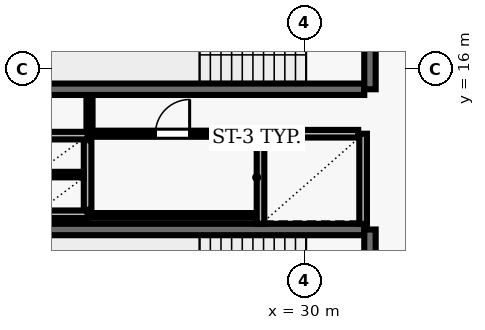
"""IFC4 building model, lengths in metres.
Left out: names, types, materials, properties, quantities, classifications, styles, units other than length and angle.
Written with IfcOpenShell. Run it as: python <this file> out.ifc"""

import sys

from ifc_helpers import new_model, si_unit, direction, frame, frame_2d, origin, place, context, subcontext, project, spatial, rectangle, extrude, element, fill, save


model = new_model("IFC4")
c1 = context("Model", 3, precision=1e-05, world=origin(), true_north=direction((0.0, 1.0)))
c2 = subcontext(c1, "Body", "Model", "MODEL_VIEW")
j1 = project(units=[si_unit("LENGTHUNIT", "METRE"), si_unit("PLANEANGLEUNIT", "RADIAN")], contexts=[c1])
p1 = place(None, origin())
s1 = spatial("IfcSite", under=j1, at=p1, CompositionType="ELEMENT")
p2 = place(p1, origin())
s2 = spatial("IfcBuilding", under=s1, at=p2, CompositionType="ELEMENT")
p3 = place(p2, frame((0.0, 0.0, 115.1)))
s3 = spatial("IfcBuildingStorey", under=s2, at=p3, CompositionType="ELEMENT", Elevation=115.1)
p4 = place(p3, frame((23.22, 15.47, 0.0), z_axis=(0.0, 0.0, 1.0), x_axis=(1.0, 0.0, 0.0)))
e1 = element("IfcWall", 1, at=p4, inside=s3, PredefinedType="SHEAR", context=c2, shape_type="SweptSolid", body=[
    extrude(rectangle(XDim=8.36, YDim=0.3, at=frame_2d((4.18, 0.0))), origin(), (0.0, 0.0, 1.0), 3.69),
])
p5 = place(p3, frame((31.73, 15.47, 0.0), z_axis=(0.0, 0.0, 1.0), x_axis=(0.0, 1.0, 0.0)))
e2 = element("IfcWall", 2, at=p5, inside=s3, PredefinedType="SHEAR", context=c2, shape_type="SweptSolid", body=[
    extrude(rectangle(XDim=3.51, YDim=0.3, at=frame_2d((1.755, 0.0))), origin(), (0.0, 0.0, 1.0), 3.69),
])
p6 = place(p5, frame((1.18, 0.0, 0.0)))
e3 = element("IfcOpeningElement", 3, at=p6, cuts=e2, PredefinedType="OPENING", context=c2, shape_type="SweptSolid", body=[
    extrude(rectangle(XDim=1.15, YDim=2.15, at=frame_2d((0.575, 1.075))), frame((0.0, 0.16, 0.0), z_axis=(0.0, -1.0, 0.0), x_axis=(1.0, 0.0, 0.0)), (0.0, 0.0, 1.0), 0.32),
])
p7 = place(p3, frame((31.58, 11.78, 0.0), z_axis=(0.0, 0.0, 1.0), x_axis=(-1.0, 0.0, 0.0)))
e4 = element("IfcWall", 4, at=p7, inside=s3, PredefinedType="SHEAR", context=c2, shape_type="SweptSolid", body=[
    extrude(rectangle(XDim=8.36, YDim=0.3, at=frame_2d((4.18, 0.0))), origin(), (0.0, 0.0, 1.0), 3.69),
])
p8 = place(p3, frame((31.73, 8.27, 0.0), z_axis=(0.0, 0.0, 1.0), x_axis=(0.0, 1.0, 0.0)))
e5 = element("IfcWall", 5, at=p8, inside=s3, PredefinedType="SHEAR", context=c2, shape_type="SweptSolid", body=[
    extrude(rectangle(XDim=3.51, YDim=0.3, at=frame_2d((1.755, 0.0))), origin(), (0.0, 0.0, 1.0), 3.69),
])
p9 = place(p8, frame((1.18, 0.0, 0.0)))
e6 = element("IfcOpeningElement", 6, at=p9, cuts=e5, PredefinedType="OPENING", context=c2, shape_type="SweptSolid", body=[
    extrude(rectangle(XDim=1.15, YDim=2.15, at=frame_2d((0.575, 1.075))), frame((0.0, 0.16, 0.0), z_axis=(0.0, -1.0, 0.0), x_axis=(1.0, 0.0, 0.0)), (0.0, 0.0, 1.0), 0.32),
])
for number, where, z_axis, x_axis in (
    (7, (28.85, 14.3, 0.0), (0.0, 0.0, 1.0), (0.0, -1.0, 0.0)),
    (8, (31.55, 11.93, 0.0), (0.0, 0.0, 1.0), (0.0, 1.0, 0.0)),
):
    element("IfcWall", number, at=place(p3, frame(where, z_axis=z_axis, x_axis=x_axis)), inside=s3, PredefinedType="SOLIDWALL", context=c2, shape_type="SweptSolid", body=[
        extrude(rectangle(XDim=2.37, YDim=0.2, at=frame_2d((1.185, 0.0))), origin(), (0.0, 0.0, 1.0), 3.69),
    ])
p10 = place(p3, frame((31.42, 14.3, 0.0), z_axis=(0.0, 0.0, 1.0), x_axis=(-1.0, 0.0, 0.0)))
e9 = element("IfcWall", 9, at=p10, inside=s3, PredefinedType="SOLIDWALL", context=c2, shape_type="SweptSolid", body=[
    extrude(rectangle(XDim=2.44, YDim=0.2, at=frame_2d((1.22, 0.0))), origin(), (0.0, 0.0, 1.0), 3.69),
])
for number, where, z_axis, x_axis in (
    (10, (22.9, 14.25, 0.0), (0.0, 0.0, 1.0), (1.0, 0.0, 0.0)),
    (11, (22.9, 12.18, 0.0), (0.0, 0.0, 1.0), (1.0, 0.0, 0.0)),
):
    element("IfcWall", number, at=place(p3, frame(where, z_axis=z_axis, x_axis=x_axis)), inside=s3, PredefinedType="SOLIDWALL", context=c2, shape_type="SweptSolid", body=[
        extrude(rectangle(XDim=1.4, YDim=0.2, at=frame_2d((0.7, 0.0))), origin(), (0.0, 0.0, 1.0), 3.69),
    ])
p11 = place(p3, frame((24.3, 12.3, 0.0), z_axis=(0.0, 0.0, 1.0), x_axis=(0.0, 1.0, 0.0)))
e12 = element("IfcWall", 12, at=p11, inside=s3, PredefinedType="SOLIDWALL", context=c2, shape_type="SweptSolid", body=[
    extrude(rectangle(XDim=1.83, YDim=0.2, at=frame_2d((0.915, 0.0))), origin(), (0.0, 0.0, 1.0), 3.69),
])
p12 = place(p3, frame((23.01, 13.225, 0.0), z_axis=(0.0, 0.0, 1.0), x_axis=(1.0, 0.0, 0.0)))
e13 = element("IfcWall", 13, at=p12, inside=s3, PredefinedType="PARTITIONING", context=c2, shape_type="SweptSolid", body=[
    extrude(rectangle(XDim=1.18, YDim=0.145, at=frame_2d((0.59, 0.0))), origin(), (0.0, 0.0, 1.0), 3.69),
])
p13 = place(p3, frame((24.35, 12.15, 0.0), z_axis=(0.0, 0.0, 1.0), x_axis=(1.0, 0.0, 0.0)))
e14 = element("IfcWall", 14, at=p13, inside=s3, PredefinedType="PARTITIONING", context=c2, shape_type="SweptSolid", body=[
    extrude(rectangle(XDim=4.37, YDim=0.125, at=frame_2d((2.185, 0.0))), origin(), (0.0, 0.0, 1.0), 3.69),
])
p14 = place(p3, frame((24.35, 14.3, 0.0), z_axis=(0.0, 0.0, 1.0), x_axis=(1.0, 0.0, 0.0)))
e15 = element("IfcWall", 15, at=p14, inside=s3, PredefinedType="PARTITIONING", context=c2, shape_type="SweptSolid", body=[
    extrude(rectangle(XDim=4.37, YDim=0.16, at=frame_2d((2.185, 0.0))), origin(), (0.0, 0.0, 1.0), 3.69),
])
p15 = place(p14, frame((1.735, 0.0, 0.0)))
e16 = element("IfcOpeningElement", 16, at=p15, cuts=e15, PredefinedType="OPENING", context=c2, shape_type="SweptSolid", body=[
    extrude(rectangle(XDim=0.9, YDim=2.1, at=frame_2d((0.45, 1.05))), frame((0.0, 0.09, 0.0), z_axis=(0.0, -1.0, 0.0), x_axis=(1.0, 0.0, 0.0)), (0.0, 0.0, 1.0), 0.18),
])
p16 = place(p3, frame((24.35, 15.29, 0.0), z_axis=(0.0, 0.0, 1.0), x_axis=(0.0, -1.0, 0.0)))
e17 = element("IfcWall", 17, at=p16, inside=s3, PredefinedType="PARTITIONING", context=c2, shape_type="SweptSolid", body=[
    extrude(rectangle(XDim=0.915, YDim=0.16, at=frame_2d((0.458, 0.0))), origin(), (0.0, 0.0, 1.0), 3.69),
])
p17 = place(p15, origin())
e18 = element("IfcDoor", 18, at=p17, inside=s3, OperationType="SINGLE_SWING_RIGHT", PredefinedType="DOOR", context=c2, shape_type="SweptSolid", body=[
    extrude(rectangle(XDim=0.9, YDim=2.1, at=frame_2d((0.45, 1.05))), frame((0.0, 0.025, 0.0), z_axis=(0.0, -1.0, 0.0), x_axis=(1.0, 0.0, 0.0)), (0.0, 0.0, 1.0), 0.05),
])
fill(e16, e18)
save(model, sys.argv[1])
